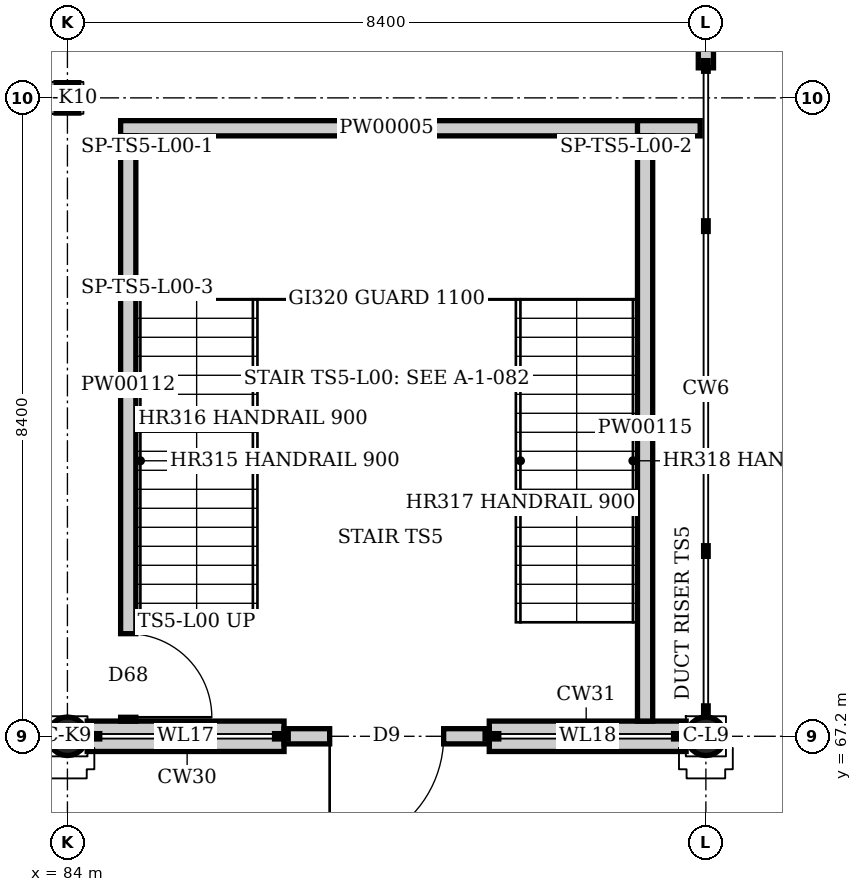
"""IFC4 building model, lengths in metres.
Left out: names, types, materials, properties, quantities, classifications, styles, units other than length and angle.
Written with IfcOpenShell. Run it as: python <this file> out.ifc"""

import sys

from ifc_helpers import new_model, si_unit, direction, frame, frame_2d, origin, origin_2d, place, context, subcontext, project, spatial, rectangle, hollow_circle, i_section, extrude, element, fill, save


model = new_model("IFC4")
c1 = context("Model", 3, precision=1e-05, world=origin(), true_north=direction((0.0, 1.0)))
c2 = subcontext(c1, "Body", "Model", "MODEL_VIEW")
j1 = project(units=[si_unit("LENGTHUNIT", "METRE"), si_unit("PLANEANGLEUNIT", "RADIAN")], contexts=[c1])
p1 = place(None, origin())
s1 = spatial("IfcSite", under=j1, at=p1, CompositionType="ELEMENT")
p2 = place(p1, origin())
s2 = spatial("IfcBuilding", under=s1, at=p2, CompositionType="ELEMENT")
p3 = place(p2, origin())
s3 = spatial("IfcBuildingStorey", under=s2, at=p3, CompositionType="ELEMENT", Elevation=0.0)
for number, where, z_axis, x_axis in (
    (1, (84.0, 67.2, -0.7), (0.0, 0.0, 1.0), (1.0, 0.0, 0.0)),
    (2, (92.4, 67.2, -0.7), (0.0, 0.0, 1.0), (1.0, 0.0, 0.0)),
):
    element("IfcColumn", number, at=place(p3, frame(where, z_axis=z_axis, x_axis=x_axis)), inside=s3, PredefinedType="COLUMN", context=c2, shape_type="SweptSolid", body=[
        extrude(hollow_circle(Radius=0.254, WallThickness=0.016, at=origin_2d()), origin(), (0.0, 0.0, 1.0), 6.7),
    ])
p4 = place(p3, frame((84.0, 75.6, -0.7), z_axis=(0.0, 0.0, 1.0), x_axis=(1.0, 0.0, 0.0)))
e3 = element("IfcColumn", 3, at=p4, inside=s3, PredefinedType="COLUMN", context=c2, shape_type="SweptSolid", body=[
    extrude(i_section(OverallWidth=0.3, OverallDepth=0.4, WebThickness=0.013, FlangeThickness=0.024, at=origin_2d()), origin(), (0.0, 0.0, 1.0), 6.7),
])
p5 = place(p3, frame((92.4, 75.995, 0.0), z_axis=(0.0, 0.0, 1.0), x_axis=(0.0, 1.0, 0.0)))
e4 = element("IfcWall", 4, at=p5, inside=s3, PredefinedType="SOLIDWALL", context=c2, shape_type="SweptSolid", body=[
    extrude(rectangle(XDim=3.11, YDim=0.2, at=frame_2d((1.555, 0.0))), origin(), (0.0, 0.0, 1.0), 5.198),
])
p6 = place(p5, frame((0.655, 0.0, 0.0)))
e5 = element("IfcOpeningElement", 5, at=p6, cuts=e4, PredefinedType="OPENING", context=c2, shape_type="SweptSolid", body=[
    extrude(rectangle(XDim=1.8, YDim=2.4, at=frame_2d((0.9, 1.2))), frame((0.0, 0.11, 0.0), z_axis=(0.0, -1.0, 0.0), x_axis=(1.0, 0.0, 0.0)), (0.0, 0.0, 1.0), 0.22),
])
p7 = place(p3, frame((84.26, 67.2, 0.0), z_axis=(0.0, 0.0, 1.0), x_axis=(1.0, 0.0, 0.0)))
e6 = element("IfcWall", 6, at=p7, inside=s3, PredefinedType="SOLIDWALL", context=c2, shape_type="SweptSolid", body=[
    extrude(rectangle(XDim=2.59, YDim=0.4, at=frame_2d((1.295, 0.0))), origin(), (0.0, 0.0, 1.0), 1.2),
])
p8 = place(p3, frame((89.55, 67.2, 0.0), z_axis=(0.0, 0.0, 1.0), x_axis=(1.0, 0.0, 0.0)))
e7 = element("IfcWall", 7, at=p8, inside=s3, PredefinedType="SOLIDWALL", context=c2, shape_type="SweptSolid", body=[
    extrude(rectangle(XDim=2.59, YDim=0.4, at=frame_2d((1.295, 0.0))), origin(), (0.0, 0.0, 1.0), 1.2),
])
p9 = place(p3, frame((86.85, 67.2, 0.0), z_axis=(0.0, 0.0, 1.0), x_axis=(1.0, 0.0, 0.0)))
e8 = element("IfcWall", 8, at=p9, inside=s3, PredefinedType="SOLIDWALL", context=c2, shape_type="SweptSolid", body=[
    extrude(rectangle(XDim=2.7, YDim=0.2, at=frame_2d((1.35, 0.0))), origin(), (0.0, 0.0, 1.0), 5.198),
])
p10 = place(p9, frame((0.6, 0.0, 0.0)))
e9 = element("IfcOpeningElement", 9, at=p10, cuts=e8, PredefinedType="OPENING", context=c2, shape_type="SweptSolid", body=[
    extrude(rectangle(XDim=1.5, YDim=2.4, at=frame_2d((0.75, 1.2))), frame((0.0, 0.11, 0.0), z_axis=(0.0, -1.0, 0.0), x_axis=(1.0, 0.0, 0.0)), (0.0, 0.0, 1.0), 0.22),
])
p11 = place(p3, frame((84.7, 75.2, 0.0), z_axis=(0.0, 0.0, 1.0), x_axis=(1.0, 0.0, 0.0)))
e10 = element("IfcWall", 10, at=p11, inside=s3, PredefinedType="PARTITIONING", context=c2, shape_type="SweptSolid", body=[
    extrude(rectangle(XDim=7.0, YDim=0.2, at=frame_2d((3.5, 0.0))), origin(), (0.0, 0.0, 1.0), 5.8),
])
p12 = place(p3, frame((91.5, 75.2, 0.0), z_axis=(0.0, 0.0, 1.0), x_axis=(1.0, 0.0, 0.0)))
e11 = element("IfcWall", 11, at=p12, inside=s3, PredefinedType="PARTITIONING", context=c2, shape_type="SweptSolid", body=[
    extrude(rectangle(XDim=0.825, YDim=0.2, at=frame_2d((0.413, 0.0))), origin(), (0.0, 0.0, 1.0), 5.8),
])
p13 = place(p3, frame((84.8, 67.4, 0.0), z_axis=(0.0, 0.0, 1.0), x_axis=(0.0, 1.0, 0.0)))
e12 = element("IfcWall", 12, at=p13, inside=s3, PredefinedType="PARTITIONING", context=c2, shape_type="SweptSolid", body=[
    extrude(rectangle(XDim=7.7, YDim=0.2, at=frame_2d((3.85, 0.0))), origin(), (0.0, 0.0, 1.0), 5.8),
])
p14 = place(p13, frame((0.05, 0.0, 0.0)))
e13 = element("IfcOpeningElement", 13, at=p14, cuts=e12, PredefinedType="OPENING", context=c2, shape_type="SweptSolid", body=[
    extrude(rectangle(XDim=1.1, YDim=2.4, at=frame_2d((0.55, 1.2))), frame((0.0, 0.11, 0.0), z_axis=(0.0, -1.0, 0.0), x_axis=(1.0, 0.0, 0.0)), (0.0, 0.0, 1.0), 0.22),
])
p15 = place(p3, frame((91.6, 67.4, 0.0), z_axis=(0.0, 0.0, 1.0), x_axis=(0.0, 1.0, 0.0)))
e14 = element("IfcWall", 14, at=p15, inside=s3, PredefinedType="PARTITIONING", context=c2, shape_type="SweptSolid", body=[
    extrude(rectangle(XDim=7.7, YDim=0.2, at=frame_2d((3.85, 0.0))), origin(), (0.0, 0.0, 1.0), 5.8),
])
for number, where, z_axis, x_axis in (
    (15, (85.05, 74.95, 0.0), (0.0, 0.0, 1.0), (1.0, 0.0, 0.0)),
    (16, (91.35, 74.95, 0.0), (0.0, 0.0, 1.0), (1.0, 0.0, 0.0)),
    (17, (85.05, 73.1, 0.0), (0.0, 0.0, 1.0), (1.0, 0.0, 0.0)),
):
    element("IfcColumn", number, at=place(p3, frame(where, z_axis=z_axis, x_axis=x_axis)), inside=s3, PredefinedType="COLUMN", context=c2, shape_type="SweptSolid", body=[
        extrude(hollow_circle(Radius=0.07, WallThickness=0.008, at=origin_2d()), origin(), (0.0, 0.0, 1.0), 2.8),
    ])
p16 = place(p10, frame((1.5, 0.0, 0.0), z_axis=(0.0, 0.0, 1.0), x_axis=(-1.0, 0.0, 0.0)))
e18 = element("IfcDoor", 18, at=p16, inside=s3, OperationType="SINGLE_SWING_RIGHT", PredefinedType="DOOR", context=c2, shape_type="SweptSolid", body=[
    extrude(rectangle(XDim=1.5, YDim=2.4, at=frame_2d((0.75, 1.2))), frame((0.0, 0.025, 0.0), z_axis=(0.0, -1.0, 0.0), x_axis=(1.0, 0.0, 0.0)), (0.0, 0.0, 1.0), 0.05),
])
fill(e9, e18)
p17 = place(p14, frame((1.1, 0.0, 0.0), z_axis=(0.0, 0.0, 1.0), x_axis=(-1.0, 0.0, 0.0)))
e19 = element("IfcDoor", 19, at=p17, inside=s3, OperationType="SINGLE_SWING_RIGHT", PredefinedType="DOOR", context=c2, shape_type="SweptSolid", body=[
    extrude(rectangle(XDim=1.1, YDim=2.4, at=frame_2d((0.55, 1.2))), frame((0.0, 0.025, 0.0), z_axis=(0.0, -1.0, 0.0), x_axis=(1.0, 0.0, 0.0)), (0.0, 0.0, 1.0), 0.05),
])
fill(e13, e19)
save(model, sys.argv[1])
